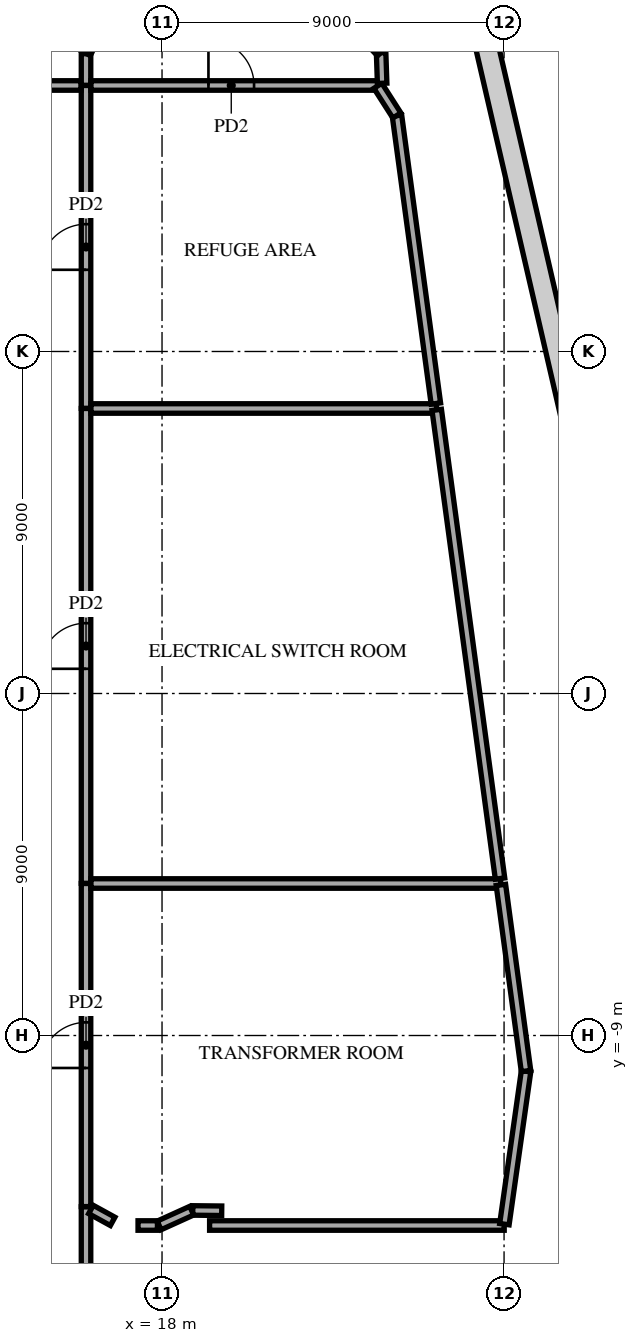
"""IFC4 building model, lengths in metres.
Left out: names, types, materials, properties, quantities, classifications, styles, units other than length and angle.
Written with IfcOpenShell. Run it as: python <this file> out.ifc"""

import sys

from ifc_helpers import new_model, si_unit, direction, frame, frame_2d, origin, place, context, subcontext, project, spatial, rectangle, extrude, element, fill, save


model = new_model("IFC4")
c1 = context("Model", 3, precision=1e-05, world=origin(), true_north=direction((0.0, 1.0)))
c2 = subcontext(c1, "Body", "Model", "MODEL_VIEW")
j1 = project(units=[si_unit("LENGTHUNIT", "METRE"), si_unit("PLANEANGLEUNIT", "RADIAN")], contexts=[c1])
p1 = place(None, origin())
s1 = spatial("IfcSite", under=j1, at=p1, CompositionType="ELEMENT")
p2 = place(p1, origin())
s2 = spatial("IfcBuilding", under=s1, at=p2, CompositionType="ELEMENT")
p3 = place(p2, frame((0.0, 0.0, 76.5)))
s3 = spatial("IfcBuildingStorey", under=s2, at=p3, CompositionType="ELEMENT", Elevation=76.5)
p4 = place(p3, frame((16.0, -15.788, 0.0), z_axis=(0.0, 0.0, 1.0), x_axis=(0.0, 1.0, 0.0)))
e1 = element("IfcWall", 1, at=p4, inside=s3, PredefinedType="PARTITIONING", context=c2, shape_type="SweptSolid", body=[
    extrude(rectangle(XDim=2.281, YDim=0.25, at=frame_2d((1.141, 0.0))), origin(), (0.0, 0.0, 1.0), 4.56),
])
p5 = place(p3, frame((17.368, -14.0, 0.0), z_axis=(0.0, 0.0, 1.0), x_axis=(1.0, 0.0, 0.0)))
e2 = element("IfcWall", 2, at=p5, inside=s3, PredefinedType="PARTITIONING", context=c2, shape_type="SweptSolid", body=[
    extrude(rectangle(XDim=0.511, YDim=0.25, at=frame_2d((0.255, 0.0))), origin(), (0.0, 0.0, 1.0), 4.56),
])
p6 = place(p3, frame((19.251, -14.0, 0.0), z_axis=(0.0, 0.0, 1.0), x_axis=(1.0, 0.0, 0.0)))
e3 = element("IfcWall", 3, at=p6, inside=s3, PredefinedType="PARTITIONING", context=c2, shape_type="SweptSolid", body=[
    extrude(rectangle(XDim=7.752, YDim=0.25, at=frame_2d((3.876, 0.0))), origin(), (0.0, 0.0, 1.0), 4.56),
])
p7 = place(p3, frame((16.13, -13.578, 0.0), z_axis=(0.0, 0.0, 1.0), x_axis=(0.876674684552, -0.481083669923, 0.0)))
e4 = element("IfcWall", 4, at=p7, inside=s3, PredefinedType="PARTITIONING", context=c2, shape_type="SweptSolid", body=[
    extrude(rectangle(XDim=0.651, YDim=0.25, at=frame_2d((0.326, 0.0))), origin(), (0.0, 0.0, 1.0), 4.56),
])
p8 = place(p3, frame((18.809, -13.604, 0.0), z_axis=(0.0, 0.0, 1.0), x_axis=(0.999944069042, -0.010576331499, 0.0)))
e5 = element("IfcWall", 5, at=p8, inside=s3, PredefinedType="PARTITIONING", context=c2, shape_type="SweptSolid", body=[
    extrude(rectangle(XDim=0.762, YDim=0.25, at=frame_2d((0.381, 0.0))), origin(), (0.0, 0.0, 1.0), 4.56),
])
p9 = place(p3, frame((17.924, -13.998, 0.0), z_axis=(0.0, 0.0, 1.0), x_axis=(0.910810537866, 0.41282461665, 0.0)))
e6 = element("IfcWall", 6, at=p9, inside=s3, PredefinedType="PARTITIONING", context=c2, shape_type="SweptSolid", body=[
    extrude(rectangle(XDim=0.94, YDim=0.25, at=frame_2d((0.47, 0.0))), origin(), (0.0, 0.0, 1.0), 4.56),
])
p10 = place(p3, frame((16.0, -13.501, 0.0), z_axis=(0.0, 0.0, 1.0), x_axis=(0.0, 1.0, 0.0)))
e7 = element("IfcWall", 7, at=p10, inside=s3, PredefinedType="PARTITIONING", context=c2, shape_type="SweptSolid", body=[
    extrude(rectangle(XDim=8.501, YDim=0.25, at=frame_2d((4.251, 0.0))), origin(), (0.0, 0.0, 1.0), 4.06),
])
p11 = place(p10, frame((3.647, 0.0, 0.0)))
e8 = element("IfcOpeningElement", 8, at=p11, cuts=e7, PredefinedType="OPENING", context=c2, shape_type="SweptSolid", body=[
    extrude(rectangle(XDim=1.2, YDim=2.1, at=frame_2d((0.6, 1.05))), frame((0.0, 0.135, 0.0), z_axis=(0.0, -1.0, 0.0), x_axis=(1.0, 0.0, 0.0)), (0.0, 0.0, 1.0), 0.27),
])
p12 = place(p3, frame((27.009, -13.965, 0.0), z_axis=(0.0, 0.0, 1.0), x_axis=(0.140134617206, 0.990132460361, 0.0)))
e9 = element("IfcWall", 9, at=p12, inside=s3, PredefinedType="PARTITIONING", context=c2, shape_type="SweptSolid", body=[
    extrude(rectangle(XDim=4.064, YDim=0.25, at=frame_2d((2.032, 0.0))), origin(), (0.0, 0.0, 1.0), 4.06),
])
p13 = place(p3, frame((16.0, -4.995, 0.0), z_axis=(0.0, 0.0, 1.0), x_axis=(0.0, 1.0, 0.0)))
e10 = element("IfcWall", 10, at=p13, inside=s3, PredefinedType="PARTITIONING", context=c2, shape_type="SweptSolid", body=[
    extrude(rectangle(XDim=12.495, YDim=0.25, at=frame_2d((6.248, 0.0))), origin(), (0.0, 0.0, 1.0), 4.56),
])
p14 = place(p13, frame((5.645, 0.0, 0.0)))
e11 = element("IfcOpeningElement", 11, at=p14, cuts=e10, PredefinedType="OPENING", context=c2, shape_type="SweptSolid", body=[
    extrude(rectangle(XDim=1.2, YDim=2.1, at=frame_2d((0.6, 1.05))), frame((0.0, 0.135, 0.0), z_axis=(0.0, -1.0, 0.0), x_axis=(1.0, 0.0, 0.0)), (0.0, 0.0, 1.0), 0.27),
])
p15 = place(p3, frame((16.13, -5.0, 0.0), z_axis=(0.0, 0.0, 1.0), x_axis=(1.0, 0.0, 0.0)))
e12 = element("IfcWall", 12, at=p15, inside=s3, PredefinedType="PARTITIONING", context=c2, shape_type="SweptSolid", body=[
    extrude(rectangle(XDim=10.782, YDim=0.25, at=frame_2d((5.391, 0.0))), origin(), (0.0, 0.0, 1.0), 5.18),
])
p16 = place(p3, frame((26.917, -5.037, 0.0), z_axis=(0.0, 0.0, 1.0), x_axis=(0.133816939393, -0.991006067959, 0.0)))
e13 = element("IfcWall", 13, at=p16, inside=s3, PredefinedType="PARTITIONING", context=c2, shape_type="SweptSolid", body=[
    extrude(rectangle(XDim=4.942, YDim=0.25, at=frame_2d((2.471, 0.0))), origin(), (0.0, 0.0, 1.0), 4.56),
])
p17 = place(p3, frame((16.0, 7.505, 0.0), z_axis=(0.0, 0.0, 1.0), x_axis=(0.0, 1.0, 0.0)))
e14 = element("IfcWall", 14, at=p17, inside=s3, PredefinedType="PARTITIONING", context=c2, shape_type="SweptSolid", body=[
    extrude(rectangle(XDim=8.495, YDim=0.25, at=frame_2d((4.248, 0.0))), origin(), (0.0, 0.0, 1.0), 4.56),
])
p18 = place(p17, frame((3.645, 0.0, 0.0)))
e15 = element("IfcOpeningElement", 15, at=p18, cuts=e14, PredefinedType="OPENING", context=c2, shape_type="SweptSolid", body=[
    extrude(rectangle(XDim=1.2, YDim=2.1, at=frame_2d((0.6, 1.05))), frame((0.0, 0.135, 0.0), z_axis=(0.0, -1.0, 0.0), x_axis=(1.0, 0.0, 0.0)), (0.0, 0.0, 1.0), 0.27),
])
p19 = place(p3, frame((16.13, 7.5, 0.0), z_axis=(0.0, 0.0, 1.0), x_axis=(1.0, 0.0, 0.0)))
e16 = element("IfcWall", 16, at=p19, inside=s3, PredefinedType="PARTITIONING", context=c2, shape_type="SweptSolid", body=[
    extrude(rectangle(XDim=9.094, YDim=0.25, at=frame_2d((4.547, 0.0))), origin(), (0.0, 0.0, 1.0), 5.18),
])
p20 = place(p3, frame((25.229, 7.463, 0.0), z_axis=(0.0, 0.0, 1.0), x_axis=(0.133831459715, -0.991004107151, 0.0)))
e17 = element("IfcWall", 17, at=p20, inside=s3, PredefinedType="PARTITIONING", context=c2, shape_type="SweptSolid", body=[
    extrude(rectangle(XDim=12.445, YDim=0.25, at=frame_2d((6.223, 0.0))), origin(), (0.0, 0.0, 1.0), 4.56),
])
p21 = place(p3, frame((24.182, 15.206, 0.0), z_axis=(0.0, 0.0, 1.0), x_axis=(0.133897553771, -0.990995179148, 0.0)))
e18 = element("IfcWall", 18, at=p21, inside=s3, PredefinedType="PARTITIONING", context=c2, shape_type="SweptSolid", body=[
    extrude(rectangle(XDim=7.645, YDim=0.25, at=frame_2d((3.823, 0.0))), origin(), (0.0, 0.0, 1.0), 4.152),
])
p22 = place(p3, frame((3.505, 16.0, 0.0), z_axis=(0.0, 0.0, 1.0), x_axis=(1.0, 0.0, 0.0)))
e19 = element("IfcWall", 19, at=p22, inside=s3, PredefinedType="PARTITIONING", context=c2, shape_type="SweptSolid", body=[
    extrude(rectangle(XDim=12.365, YDim=0.25, at=frame_2d((6.183, 0.0))), origin(), (0.0, 0.0, 1.0), 4.06),
])
p23 = place(p22, frame((4.326, 0.0, 0.0)))
e20 = element("IfcOpeningElement", 20, at=p23, cuts=e19, PredefinedType="OPENING", context=c2, shape_type="SweptSolid", body=[
    extrude(rectangle(XDim=1.2, YDim=2.1, at=frame_2d((0.6, 1.05))), frame((0.0, 0.135, 0.0), z_axis=(0.0, -1.0, 0.0), x_axis=(1.0, 0.0, 0.0)), (0.0, 0.0, 1.0), 0.27),
])
p24 = place(p3, frame((16.0, 16.005, 0.0), z_axis=(0.0, 0.0, 1.0), x_axis=(0.0, 1.0, 0.0)))
e21 = element("IfcWall", 21, at=p24, inside=s3, PredefinedType="PARTITIONING", context=c2, shape_type="SweptSolid", body=[
    extrude(rectangle(XDim=0.831, YDim=0.25, at=frame_2d((0.416, 0.0))), origin(), (0.0, 0.0, 1.0), 4.56),
])
p25 = place(p3, frame((16.13, 16.0, 0.0), z_axis=(0.0, 0.0, 1.0), x_axis=(1.0, 0.0, 0.0)))
e22 = element("IfcWall", 22, at=p25, inside=s3, PredefinedType="PARTITIONING", context=c2, shape_type="SweptSolid", body=[
    extrude(rectangle(XDim=7.544, YDim=0.25, at=frame_2d((3.772, 0.0))), origin(), (0.0, 0.0, 1.0), 4.152),
])
p26 = place(p25, frame((3.092, 0.0, 0.0)))
e23 = element("IfcOpeningElement", 23, at=p26, cuts=e22, PredefinedType="OPENING", context=c2, shape_type="SweptSolid", body=[
    extrude(rectangle(XDim=1.2, YDim=2.1, at=frame_2d((0.6, 1.05))), frame((0.0, 0.135, 0.0), z_axis=(0.0, -1.0, 0.0), x_axis=(1.0, 0.0, 0.0)), (0.0, 0.0, 1.0), 0.27),
])
p27 = place(p3, frame((23.679, 15.992, 0.0), z_axis=(0.0, 0.0, 1.0), x_axis=(0.538866930082, -0.842390901936, 0.0)))
e24 = element("IfcWall", 24, at=p27, inside=s3, PredefinedType="PARTITIONING", context=c2, shape_type="SweptSolid", body=[
    extrude(rectangle(XDim=0.927, YDim=0.25, at=frame_2d((0.464, 0.0))), origin(), (0.0, 0.0, 1.0), 5.18),
])
p28 = place(p3, frame((16.002, 16.841, 0.0), z_axis=(0.0, 0.0, 1.0), x_axis=(0.441137719049, 0.897439420146, 0.0)))
e25 = element("IfcWall", 25, at=p28, inside=s3, PredefinedType="PARTITIONING", context=c2, shape_type="SweptSolid", body=[
    extrude(rectangle(XDim=6.005, YDim=0.25, at=frame_2d((3.003, 0.0))), origin(), (0.0, 0.0, 1.0), 4.56),
])
p29 = place(p3, frame((23.765, 16.862, 0.0), z_axis=(0.0, 0.0, 1.0), x_axis=(0.033688731694, -0.999432373579, 0.0)))
e26 = element("IfcWall", 26, at=p29, inside=s3, PredefinedType="PARTITIONING", context=c2, shape_type="SweptSolid", body=[
    extrude(rectangle(XDim=0.804, YDim=0.25, at=frame_2d((0.402, 0.0))), origin(), (0.0, 0.0, 1.0), 5.18),
])
p30 = place(p3, frame((18.747, 22.13, 0.0), z_axis=(0.0, 0.0, 1.0), x_axis=(0.68963168831, -0.724160296121, 0.0)))
e27 = element("IfcWall", 27, at=p30, inside=s3, PredefinedType="PARTITIONING", context=c2, shape_type="SweptSolid", body=[
    extrude(rectangle(XDim=7.269, YDim=0.25, at=frame_2d((3.634, 0.0))), origin(), (0.0, 0.0, 1.0), 4.152),
])
p31 = place(p3, frame((34.535, -17.557, 0.0), z_axis=(0.0, 0.0, 1.0), x_axis=(-0.224952674481, 0.974369690746, 0.0)))
e28 = element("IfcWall", 28, at=p31, inside=s3, PredefinedType="STANDARD", context=c2, shape_type="SweptSolid", body=[
    extrude(rectangle(XDim=49.376, YDim=0.6, at=frame_2d((24.688, 0.0))), origin(), (0.0, 0.0, 1.0), 5.18),
])
p32 = place(p31, frame((1.138, 0.0, 0.6)))
e29 = element("IfcOpeningElement", 29, at=p32, cuts=e28, PredefinedType="OPENING", context=c2, shape_type="SweptSolid", body=[
    extrude(rectangle(XDim=2.1, YDim=4.13, at=frame_2d((1.05, 2.065))), frame((0.0, 0.31, 0.0), z_axis=(0.0, -1.0, 0.0), x_axis=(1.0, 0.0, 0.0)), (0.0, 0.0, 1.0), 0.62),
])
p33 = place(p31, frame((5.576, 0.0, 0.6)))
e30 = element("IfcOpeningElement", 30, at=p33, cuts=e28, PredefinedType="OPENING", context=c2, shape_type="SweptSolid", body=[
    extrude(rectangle(XDim=2.1, YDim=4.13, at=frame_2d((1.05, 2.065))), frame((0.0, 0.31, 0.0), z_axis=(0.0, -1.0, 0.0), x_axis=(1.0, 0.0, 0.0)), (0.0, 0.0, 1.0), 0.62),
])
p34 = place(p31, frame((41.576, 0.0, 0.6)))
e31 = element("IfcOpeningElement", 31, at=p34, cuts=e28, PredefinedType="OPENING", context=c2, shape_type="SweptSolid", body=[
    extrude(rectangle(XDim=2.1, YDim=4.13, at=frame_2d((1.05, 2.065))), frame((0.0, 0.31, 0.0), z_axis=(0.0, -1.0, 0.0), x_axis=(1.0, 0.0, 0.0)), (0.0, 0.0, 1.0), 0.62),
])
p35 = place(p31, frame((46.076, 0.0, 0.6)))
e32 = element("IfcOpeningElement", 32, at=p35, cuts=e28, PredefinedType="OPENING", context=c2, shape_type="SweptSolid", body=[
    extrude(rectangle(XDim=2.1, YDim=4.13, at=frame_2d((1.05, 2.065))), frame((0.0, 0.31, 0.0), z_axis=(0.0, -1.0, 0.0), x_axis=(1.0, 0.0, 0.0)), (0.0, 0.0, 1.0), 0.62),
])
p36 = place(p18, origin())
e33 = element("IfcDoor", 33, at=p36, inside=s3, OperationType="SINGLE_SWING_LEFT", PredefinedType="DOOR", context=c2, shape_type="SweptSolid", body=[
    extrude(rectangle(XDim=1.2, YDim=2.1, at=frame_2d((0.6, 1.05))), frame((0.0, 0.025, 0.0), z_axis=(0.0, -1.0, 0.0), x_axis=(1.0, 0.0, 0.0)), (0.0, 0.0, 1.0), 0.05),
])
fill(e15, e33)
p37 = place(p14, origin())
e34 = element("IfcDoor", 34, at=p37, inside=s3, OperationType="SINGLE_SWING_RIGHT", PredefinedType="DOOR", context=c2, shape_type="SweptSolid", body=[
    extrude(rectangle(XDim=1.2, YDim=2.1, at=frame_2d((0.6, 1.05))), frame((0.0, 0.025, 0.0), z_axis=(0.0, -1.0, 0.0), x_axis=(1.0, 0.0, 0.0)), (0.0, 0.0, 1.0), 0.05),
])
fill(e11, e34)
p38 = place(p11, origin())
e35 = element("IfcDoor", 35, at=p38, inside=s3, OperationType="SINGLE_SWING_LEFT", PredefinedType="DOOR", context=c2, shape_type="SweptSolid", body=[
    extrude(rectangle(XDim=1.2, YDim=2.1, at=frame_2d((0.6, 1.05))), frame((0.0, 0.025, 0.0), z_axis=(0.0, -1.0, 0.0), x_axis=(1.0, 0.0, 0.0)), (0.0, 0.0, 1.0), 0.05),
])
fill(e8, e35)
p39 = place(p26, origin())
e36 = element("IfcDoor", 36, at=p39, inside=s3, OperationType="SINGLE_SWING_RIGHT", PredefinedType="DOOR", context=c2, shape_type="SweptSolid", body=[
    extrude(rectangle(XDim=1.2, YDim=2.1, at=frame_2d((0.6, 1.05))), frame((0.0, 0.025, 0.0), z_axis=(0.0, -1.0, 0.0), x_axis=(1.0, 0.0, 0.0)), (0.0, 0.0, 1.0), 0.05),
])
fill(e23, e36)
save(model, sys.argv[1])
